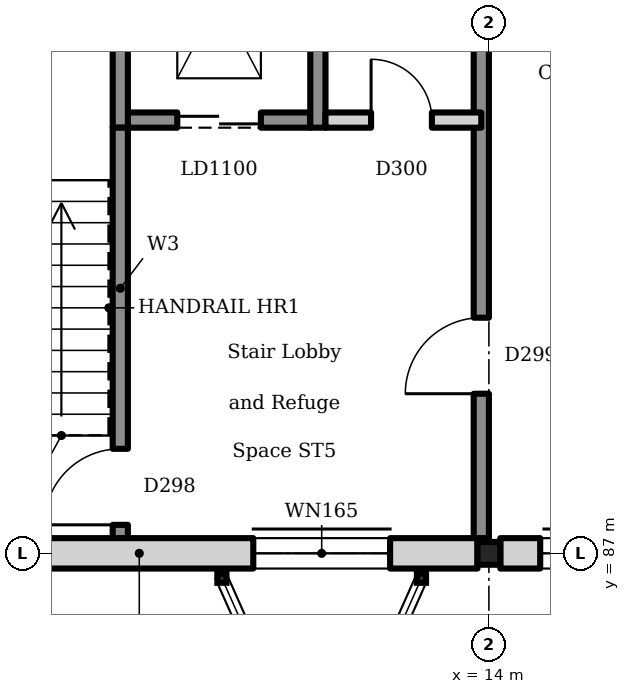
"""IFC4 building model, lengths in metres.
Left out: names, types, materials, properties, quantities, classifications, styles, units other than length and angle.
Written with IfcOpenShell. Run it as: python <this file> out.ifc"""

import sys

from ifc_helpers import new_model, si_unit, direction, frame, frame_2d, origin, origin_2d, place, context, subcontext, project, spatial, rectangle, i_section, extrude, element, fill, save


model = new_model("IFC4")
c1 = context("Model", 3, precision=1e-05, world=origin(), true_north=direction((0.0, 1.0)))
c2 = subcontext(c1, "Body", "Model", "MODEL_VIEW")
j1 = project(units=[si_unit("LENGTHUNIT", "METRE"), si_unit("PLANEANGLEUNIT", "RADIAN")], contexts=[c1])
p1 = place(None, origin())
s1 = spatial("IfcSite", under=j1, at=p1, CompositionType="ELEMENT")
p2 = place(p1, origin())
s2 = spatial("IfcBuilding", under=s1, at=p2, CompositionType="ELEMENT")
p3 = place(p2, frame((0.0, 0.0, 5.4)))
s3 = spatial("IfcBuildingStorey", under=s2, at=p3, CompositionType="ELEMENT", Elevation=5.4)
p4 = place(p3, frame((9.25, 92.7, 0.0), z_axis=(0.0, 0.0, 1.0), x_axis=(1.0, 0.0, 0.0)))
e1 = element("IfcWall", 1, at=p4, inside=s3, PredefinedType="SOLIDWALL", context=c2, shape_type="SweptSolid", body=[
    extrude(rectangle(XDim=2.4, YDim=0.2, at=frame_2d((1.2, 0.0))), origin(), (0.0, 0.0, 1.0), 4.5),
])
p5 = place(p4, frame((0.65, 0.0, 0.0)))
e2 = element("IfcOpeningElement", 2, at=p5, cuts=e1, PredefinedType="OPENING", context=c2, shape_type="SweptSolid", body=[
    extrude(rectangle(XDim=1.1, YDim=2.1, at=frame_2d((0.55, 1.05))), frame((0.0, 0.11, 0.0), z_axis=(0.0, -1.0, 0.0), x_axis=(1.0, 0.0, 0.0)), (0.0, 0.0, 1.0), 0.22),
])
for number, where, z_axis, x_axis in (
    (3, (9.15, 92.6, 0.0), (0.0, 0.0, 1.0), (0.0, 1.0, 0.0)),
    (4, (11.75, 92.6, 0.0), (0.0, 0.0, 1.0), (0.0, 1.0, 0.0)),
):
    element("IfcWall", number, at=place(p3, frame(where, z_axis=z_axis, x_axis=x_axis)), inside=s3, PredefinedType="SOLIDWALL", context=c2, shape_type="SweptSolid", body=[
        extrude(rectangle(XDim=3.4, YDim=0.2, at=frame_2d((1.7, 0.0))), origin(), (0.0, 0.0, 1.0), 4.5),
    ])
p6 = place(p3, frame((14.0, 87.0, 0.0), z_axis=(0.0, 0.0, 1.0), x_axis=(1.0, 0.0, 0.0)))
e5 = element("IfcColumn", 5, at=p6, inside=s3, PredefinedType="COLUMN", context=c2, shape_type="SweptSolid", body=[
    extrude(i_section(OverallWidth=0.3, OverallDepth=0.3, WebThickness=0.011, FlangeThickness=0.019, FilletRadius=0.027, at=origin_2d()), origin(), (0.0, 0.0, 1.0), 4.5),
])
p7 = place(p3, frame((6.15, 87.0, 0.0), z_axis=(0.0, 0.0, 1.0), x_axis=(1.0, 0.0, 0.0)))
e6 = element("IfcWall", 6, at=p7, inside=s3, PredefinedType="SOLIDWALL", context=c2, shape_type="SweptSolid", body=[
    extrude(rectangle(XDim=7.7, YDim=0.4, at=frame_2d((3.85, 0.0))), origin(), (0.0, 0.0, 1.0), 3.93),
])
p8 = place(p7, frame((1.15, 0.0, 1.0)))
e7 = element("IfcOpeningElement", 7, at=p8, cuts=e6, PredefinedType="OPENING", context=c2, shape_type="SweptSolid", body=[
    extrude(rectangle(XDim=0.6, YDim=2.4, at=frame_2d((0.3, 1.2))), frame((0.0, 0.21, 0.0), z_axis=(0.0, -1.0, 0.0), x_axis=(1.0, 0.0, 0.0)), (0.0, 0.0, 1.0), 0.42),
])
p9 = place(p7, frame((4.75, 0.0, 0.45)))
e8 = element("IfcOpeningElement", 8, at=p9, cuts=e6, PredefinedType="OPENING", context=c2, shape_type="SweptSolid", body=[
    extrude(rectangle(XDim=1.8, YDim=3.0, at=frame_2d((0.9, 1.5))), frame((0.0, 0.21, 0.0), z_axis=(0.0, -1.0, 0.0), x_axis=(1.0, 0.0, 0.0)), (0.0, 0.0, 1.0), 0.42),
])
p10 = place(p3, frame((14.15, 87.0, 0.0), z_axis=(0.0, 0.0, 1.0), x_axis=(1.0, 0.0, 0.0)))
e9 = element("IfcWall", 9, at=p10, inside=s3, PredefinedType="SOLIDWALL", context=c2, shape_type="SweptSolid", body=[
    extrude(rectangle(XDim=7.7, YDim=0.4, at=frame_2d((3.85, 0.0))), origin(), (0.0, 0.0, 1.0), 3.93),
])
p11 = place(p10, frame((0.525, 0.0, 0.45)))
e10 = element("IfcOpeningElement", 10, at=p11, cuts=e9, PredefinedType="OPENING", context=c2, shape_type="SweptSolid", body=[
    extrude(rectangle(XDim=1.8, YDim=3.0, at=frame_2d((0.9, 1.5))), frame((0.0, 0.21, 0.0), z_axis=(0.0, -1.0, 0.0), x_axis=(1.0, 0.0, 0.0)), (0.0, 0.0, 1.0), 0.42),
])
p12 = place(p10, frame((2.95, 0.0, 0.45)))
e11 = element("IfcOpeningElement", 11, at=p12, cuts=e9, PredefinedType="OPENING", context=c2, shape_type="SweptSolid", body=[
    extrude(rectangle(XDim=1.8, YDim=3.0, at=frame_2d((0.9, 1.5))), frame((0.0, 0.21, 0.0), z_axis=(0.0, -1.0, 0.0), x_axis=(1.0, 0.0, 0.0)), (0.0, 0.0, 1.0), 0.42),
])
p13 = place(p10, frame((5.325, 0.0, 0.45)))
e12 = element("IfcOpeningElement", 12, at=p13, cuts=e9, PredefinedType="OPENING", context=c2, shape_type="SweptSolid", body=[
    extrude(rectangle(XDim=1.8, YDim=3.0, at=frame_2d((0.9, 1.5))), frame((0.0, 0.21, 0.0), z_axis=(0.0, -1.0, 0.0), x_axis=(1.0, 0.0, 0.0)), (0.0, 0.0, 1.0), 0.42),
])
p14 = place(p3, frame((9.15, 87.2, 0.0), z_axis=(0.0, 0.0, 1.0), x_axis=(0.0, 1.0, 0.0)))
e13 = element("IfcWall", 13, at=p14, inside=s3, PredefinedType="SOLIDWALL", context=c2, shape_type="SweptSolid", body=[
    extrude(rectangle(XDim=5.4, YDim=0.2, at=frame_2d((2.7, 0.0))), origin(), (0.0, 0.0, 1.0), 4.35),
])
p15 = place(p14, frame((0.175, 0.0, 0.0)))
e14 = element("IfcOpeningElement", 14, at=p15, cuts=e13, PredefinedType="OPENING", context=c2, shape_type="SweptSolid", body=[
    extrude(rectangle(XDim=1.0, YDim=2.1, at=frame_2d((0.5, 1.05))), frame((0.0, 0.11, 0.0), z_axis=(0.0, -1.0, 0.0), x_axis=(1.0, 0.0, 0.0)), (0.0, 0.0, 1.0), 0.22),
])
p16 = place(p3, frame((11.85, 92.7, 0.0), z_axis=(0.0, 0.0, 1.0), x_axis=(1.0, 0.0, 0.0)))
e15 = element("IfcWall", 15, at=p16, inside=s3, PredefinedType="SOLIDWALL", context=c2, shape_type="SweptSolid", body=[
    extrude(rectangle(XDim=2.05, YDim=0.2, at=frame_2d((1.025, 0.0))), origin(), (0.0, 0.0, 1.0), 3.91),
])
p17 = place(p16, frame((0.6, 0.0, 0.0)))
e16 = element("IfcOpeningElement", 16, at=p17, cuts=e15, PredefinedType="OPENING", context=c2, shape_type="SweptSolid", body=[
    extrude(rectangle(XDim=0.8, YDim=2.1, at=frame_2d((0.4, 1.05))), frame((0.0, 0.11, 0.0), z_axis=(0.0, -1.0, 0.0), x_axis=(1.0, 0.0, 0.0)), (0.0, 0.0, 1.0), 0.22),
])
p18 = place(p3, frame((13.9, 87.2, 0.0), z_axis=(0.0, 0.0, 1.0), x_axis=(0.0, 1.0, 0.0)))
e17 = element("IfcWall", 17, at=p18, inside=s3, PredefinedType="SOLIDWALL", context=c2, shape_type="SweptSolid", body=[
    extrude(rectangle(XDim=8.8, YDim=0.2, at=frame_2d((4.4, 0.0))), origin(), (0.0, 0.0, 1.0), 3.91),
])
p19 = place(p18, frame((1.9, 0.0, 0.0)))
e18 = element("IfcOpeningElement", 18, at=p19, cuts=e17, PredefinedType="OPENING", context=c2, shape_type="SweptSolid", body=[
    extrude(rectangle(XDim=1.0, YDim=2.1, at=frame_2d((0.5, 1.05))), frame((0.0, 0.11, 0.0), z_axis=(0.0, -1.0, 0.0), x_axis=(1.0, 0.0, 0.0)), (0.0, 0.0, 1.0), 0.22),
])
p20 = place(p5, origin())
e19 = element("IfcDoor", 19, at=p20, inside=s3, OperationType="SLIDING_TO_LEFT", PredefinedType="DOOR", context=c2, shape_type="SweptSolid", body=[
    extrude(rectangle(XDim=1.1, YDim=2.1, at=frame_2d((0.55, 1.05))), frame((0.0, 0.025, 0.0), z_axis=(0.0, -1.0, 0.0), x_axis=(1.0, 0.0, 0.0)), (0.0, 0.0, 1.0), 0.05),
])
fill(e2, e19)
p21 = place(p9, origin())
e20 = element("IfcWindow", 20, at=p21, inside=s3, PartitioningType="SINGLE_PANEL", PredefinedType="WINDOW", context=c2, shape_type="SweptSolid", body=[
    extrude(rectangle(XDim=1.8, YDim=3.0, at=frame_2d((0.9, 1.5))), frame((0.0, 0.03, 0.0), z_axis=(0.0, -1.0, 0.0), x_axis=(1.0, 0.0, 0.0)), (0.0, 0.0, 1.0), 0.06),
])
fill(e8, e20)
p22 = place(p11, origin())
e21 = element("IfcWindow", 21, at=p22, inside=s3, PartitioningType="SINGLE_PANEL", PredefinedType="WINDOW", context=c2, shape_type="SweptSolid", body=[
    extrude(rectangle(XDim=1.8, YDim=3.0, at=frame_2d((0.9, 1.5))), frame((0.0, 0.03, 0.0), z_axis=(0.0, -1.0, 0.0), x_axis=(1.0, 0.0, 0.0)), (0.0, 0.0, 1.0), 0.06),
])
fill(e10, e21)
p23 = place(p15, origin())
e22 = element("IfcDoor", 22, at=p23, inside=s3, OperationType="SINGLE_SWING_RIGHT", PredefinedType="DOOR", context=c2, shape_type="SweptSolid", body=[
    extrude(rectangle(XDim=1.0, YDim=2.1, at=frame_2d((0.5, 1.05))), frame((0.0, 0.025, 0.0), z_axis=(0.0, -1.0, 0.0), x_axis=(1.0, 0.0, 0.0)), (0.0, 0.0, 1.0), 0.05),
])
fill(e14, e22)
p24 = place(p19, origin())
e23 = element("IfcDoor", 23, at=p24, inside=s3, OperationType="SINGLE_SWING_RIGHT", PredefinedType="DOOR", context=c2, shape_type="SweptSolid", body=[
    extrude(rectangle(XDim=1.0, YDim=2.1, at=frame_2d((0.5, 1.05))), frame((0.0, 0.025, 0.0), z_axis=(0.0, -1.0, 0.0), x_axis=(1.0, 0.0, 0.0)), (0.0, 0.0, 1.0), 0.05),
])
fill(e18, e23)
p25 = place(p17, origin())
e24 = element("IfcDoor", 24, at=p25, inside=s3, OperationType="SINGLE_SWING_RIGHT", PredefinedType="DOOR", context=c2, shape_type="SweptSolid", body=[
    extrude(rectangle(XDim=0.8, YDim=2.1, at=frame_2d((0.4, 1.05))), frame((0.0, 0.025, 0.0), z_axis=(0.0, -1.0, 0.0), x_axis=(1.0, 0.0, 0.0)), (0.0, 0.0, 1.0), 0.05),
])
fill(e16, e24)
save(model, sys.argv[1])
